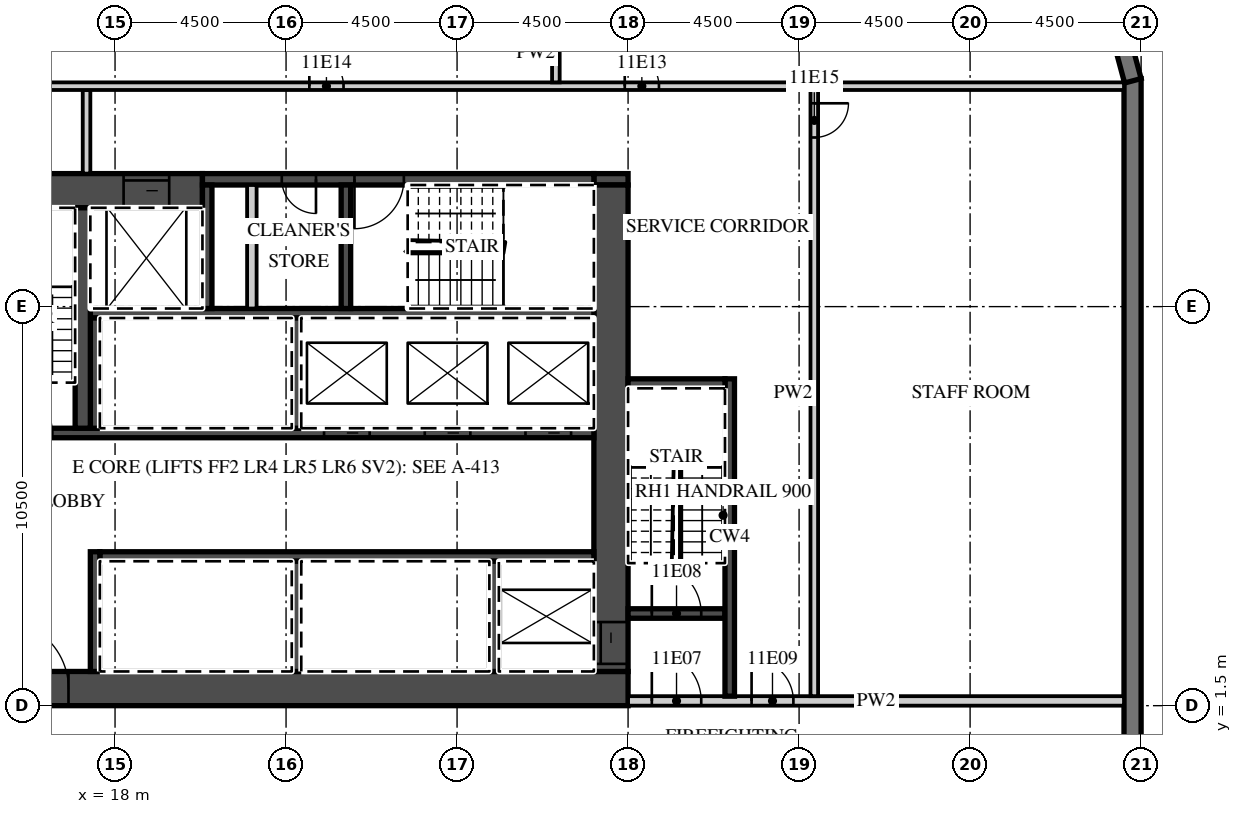
"""IFC4 building model, lengths in metres.
Left out: names, types, materials, properties, quantities, classifications, styles, units other than length and angle.
Written with IfcOpenShell. Run it as: python <this file> out.ifc"""

import sys

from ifc_helpers import new_model, si_unit, direction, frame, frame_2d, origin, place, context, subcontext, project, spatial, polyline, rectangle, outline, extrude, element, fill, save


model = new_model("IFC4")
c1 = context("Model", 3, precision=1e-05, world=origin(), true_north=direction((0.0, 1.0)))
c2 = subcontext(c1, "Body", "Model", "MODEL_VIEW")
j1 = project(units=[si_unit("LENGTHUNIT", "METRE"), si_unit("PLANEANGLEUNIT", "RADIAN")], contexts=[c1])
p1 = place(None, origin())
s1 = spatial("IfcSite", under=j1, at=p1, CompositionType="ELEMENT")
p2 = place(p1, origin())
s2 = spatial("IfcBuilding", under=s1, at=p2, CompositionType="ELEMENT")
p3 = place(p2, frame((0.0, 0.0, 66.6)))
s3 = spatial("IfcBuildingStorey", under=s2, at=p3, CompositionType="ELEMENT", Elevation=66.6)
p4 = place(p3, frame((44.775, -18.0, 0.0), z_axis=(0.0, 0.0, 1.0), x_axis=(0.0, 1.0, 0.0)))
e1 = element("IfcWall", 1, at=p4, inside=s3, PredefinedType="SOLIDWALL", context=c2, shape_type="SweptSolid", body=[
    extrude(rectangle(XDim=36.0, YDim=0.45, at=frame_2d((18.0, 0.0))), origin(), (0.0, 0.0, 1.0), 3.02),
])
p5 = place(p4, frame((3.9, 0.0, 0.45)))
e2 = element("IfcOpeningElement", 2, at=p5, cuts=e1, PredefinedType="OPENING", context=c2, shape_type="SweptSolid", body=[
    extrude(rectangle(XDim=3.3, YDim=2.25, at=frame_2d((1.65, 1.125))), frame((0.0, 0.235, 0.0), z_axis=(0.0, -1.0, 0.0), x_axis=(1.0, 0.0, 0.0)), (0.0, 0.0, 1.0), 0.47),
])
p6 = place(p4, frame((8.4, 0.0, 0.45)))
e3 = element("IfcOpeningElement", 3, at=p6, cuts=e1, PredefinedType="OPENING", context=c2, shape_type="SweptSolid", body=[
    extrude(rectangle(XDim=3.3, YDim=2.25, at=frame_2d((1.65, 1.125))), frame((0.0, 0.235, 0.0), z_axis=(0.0, -1.0, 0.0), x_axis=(1.0, 0.0, 0.0)), (0.0, 0.0, 1.0), 0.47),
])
p7 = place(p4, frame((12.9, 0.0, 0.45)))
e4 = element("IfcOpeningElement", 4, at=p7, cuts=e1, PredefinedType="OPENING", context=c2, shape_type="SweptSolid", body=[
    extrude(rectangle(XDim=3.3, YDim=2.25, at=frame_2d((1.65, 1.125))), frame((0.0, 0.235, 0.0), z_axis=(0.0, -1.0, 0.0), x_axis=(1.0, 0.0, 0.0)), (0.0, 0.0, 1.0), 0.47),
])
p8 = place(p3, frame((44.783, 17.942, 0.0), z_axis=(0.0, 0.0, 1.0), x_axis=(-0.25881466832, 0.965926999034, 0.0)))
e5 = element("IfcWall", 5, at=p8, inside=s3, PredefinedType="SOLIDWALL", context=c2, shape_type="SweptSolid", body=[
    extrude(outline(polyline([(0.0, -0.225), (2.071, -0.225), (1.95, 0.225), (0.121, 0.225), (0.0, -0.225)])), origin(), (0.0, 0.0, 1.0), 3.02),
])
p9 = place(p3, frame((13.5, 1.95, 0.0), z_axis=(0.0, 0.0, 1.0), x_axis=(1.0, 0.0, 0.0)))
e6 = element("IfcWall", 6, at=p9, inside=s3, PredefinedType="SHEAR", context=c2, shape_type="SweptSolid", body=[
    extrude(rectangle(XDim=18.0, YDim=0.9, at=frame_2d((9.0, 0.0))), origin(), (0.0, 0.0, 1.0), 3.02),
])
p10 = place(p9, frame((1.475, 0.0, 0.0)))
e7 = element("IfcOpeningElement", 7, at=p10, cuts=e6, PredefinedType="OPENING", context=c2, shape_type="SweptSolid", body=[
    extrude(rectangle(XDim=1.8, YDim=2.1, at=frame_2d((0.9, 1.05))), frame((0.0, 0.46, 0.0), z_axis=(0.0, -1.0, 0.0), x_axis=(1.0, 0.0, 0.0)), (0.0, 0.0, 1.0), 0.92),
])
p11 = place(p3, frame((13.5, 15.05, 0.0), z_axis=(0.0, 0.0, 1.0), x_axis=(1.0, 0.0, 0.0)))
e8 = element("IfcWall", 8, at=p11, inside=s3, PredefinedType="SHEAR", context=c2, shape_type="SweptSolid", body=[
    extrude(rectangle(XDim=6.8, YDim=0.9, at=frame_2d((3.4, 0.0))), origin(), (0.0, 0.0, 1.0), 3.02),
])
p12 = place(p11, frame((4.725, 0.0, 0.0)))
e9 = element("IfcOpeningElement", 9, at=p12, cuts=e8, PredefinedType="OPENING", context=c2, shape_type="SweptSolid", body=[
    extrude(rectangle(XDim=1.2, YDim=2.1, at=frame_2d((0.6, 1.05))), frame((0.0, 0.46, 0.0), z_axis=(0.0, -1.0, 0.0), x_axis=(1.0, 0.0, 0.0)), (0.0, 0.0, 1.0), 0.92),
])
p13 = place(p3, frame((30.6, 15.35, 0.0), z_axis=(0.0, 0.0, 1.0), x_axis=(1.0, 0.0, 0.0)))
e10 = element("IfcWall", 10, at=p13, inside=s3, PredefinedType="SHEAR", context=c2, shape_type="SweptSolid", body=[
    extrude(rectangle(XDim=0.9, YDim=0.3, at=frame_2d((0.45, 0.0))), origin(), (0.0, 0.0, 1.0), 3.02),
])
p14 = place(p3, frame((20.3, 15.35, 0.0), z_axis=(0.0, 0.0, 1.0), x_axis=(1.0, 0.0, 0.0)))
e11 = element("IfcWall", 11, at=p14, inside=s3, PredefinedType="SHEAR", context=c2, shape_type="SweptSolid", body=[
    extrude(rectangle(XDim=10.3, YDim=0.3, at=frame_2d((5.15, 0.0))), origin(), (0.0, 0.0, 1.0), 3.02),
])
p15 = place(p14, frame((4.0, 0.0, 0.0)))
e12 = element("IfcOpeningElement", 12, at=p15, cuts=e11, PredefinedType="OPENING", context=c2, shape_type="SweptSolid", body=[
    extrude(rectangle(XDim=1.3, YDim=2.1, at=frame_2d((0.65, 1.05))), frame((0.0, 0.16, 0.0), z_axis=(0.0, -1.0, 0.0), x_axis=(1.0, 0.0, 0.0)), (0.0, 0.0, 1.0), 0.32),
])
p16 = place(p14, frame((2.087, 0.0, 0.0)))
e13 = element("IfcOpeningElement", 13, at=p16, cuts=e11, PredefinedType="OPENING", context=c2, shape_type="SweptSolid", body=[
    extrude(rectangle(XDim=0.9, YDim=2.1, at=frame_2d((0.45, 1.05))), frame((0.0, 0.16, 0.0), z_axis=(0.0, -1.0, 0.0), x_axis=(1.0, 0.0, 0.0)), (0.0, 0.0, 1.0), 0.32),
])
p17 = place(p3, frame((31.05, 2.4, 0.0), z_axis=(0.0, 0.0, 1.0), x_axis=(0.0, 1.0, 0.0)))
e14 = element("IfcWall", 14, at=p17, inside=s3, PredefinedType="SHEAR", context=c2, shape_type="SweptSolid", body=[
    extrude(rectangle(XDim=12.8, YDim=0.9, at=frame_2d((6.4, 0.0))), origin(), (0.0, 0.0, 1.0), 3.02),
])
p18 = place(p17, frame((0.2, 0.0, 0.0)))
e15 = element("IfcOpeningElement", 15, at=p18, cuts=e14, PredefinedType="OPENING", context=c2, shape_type="SweptSolid", body=[
    extrude(rectangle(XDim=1.1, YDim=2.1, at=frame_2d((0.55, 1.05))), frame((0.0, 0.46, 0.0), z_axis=(0.0, -1.0, 0.0), x_axis=(1.0, 0.0, 0.0)), (0.0, 0.0, 1.0), 0.92),
])
p19 = place(p3, frame((17.6, 5.425, 0.0), z_axis=(0.0, 0.0, 1.0), x_axis=(1.0, 0.0, 0.0)))
e16 = element("IfcWall", 16, at=p19, inside=s3, PredefinedType="SHEAR", context=c2, shape_type="SweptSolid", body=[
    extrude(rectangle(XDim=13.0, YDim=0.25, at=frame_2d((6.5, 0.0))), origin(), (0.0, 0.0, 1.0), 3.02),
])
p20 = place(p3, frame((17.475, 2.4, 0.0), z_axis=(0.0, 0.0, 1.0), x_axis=(0.0, 1.0, 0.0)))
e17 = element("IfcWall", 17, at=p20, inside=s3, PredefinedType="SHEAR", context=c2, shape_type="SweptSolid", body=[
    extrude(rectangle(XDim=3.15, YDim=0.25, at=frame_2d((1.575, 0.0))), origin(), (0.0, 0.0, 1.0), 3.02),
])
for number, where, z_axis, x_axis in (
    (18, (27.975, 2.4, 0.0), (0.0, 0.0, 1.0), (0.0, 1.0, 0.0)),
    (19, (22.775, 2.4, 0.0), (0.0, 0.0, 1.0), (0.0, 1.0, 0.0)),
):
    element("IfcWall", number, at=place(p3, frame(where, z_axis=z_axis, x_axis=x_axis)), inside=s3, PredefinedType="SHEAR", context=c2, shape_type="SweptSolid", body=[
        extrude(rectangle(XDim=2.9, YDim=0.25, at=frame_2d((1.45, 0.0))), origin(), (0.0, 0.0, 1.0), 3.02),
    ])
p21 = place(p3, frame((14.4, 8.675, 0.0), z_axis=(0.0, 0.0, 1.0), x_axis=(1.0, 0.0, 0.0)))
e20 = element("IfcWall", 20, at=p21, inside=s3, PredefinedType="SHEAR", context=c2, shape_type="SweptSolid", body=[
    extrude(rectangle(XDim=16.2, YDim=0.25, at=frame_2d((8.1, 0.0))), origin(), (0.0, 0.0, 1.0), 3.02),
])
p22 = place(p21, frame((14.4, 0.0, 0.0)))
e21 = element("IfcOpeningElement", 21, at=p22, cuts=e20, PredefinedType="OPENING", context=c2, shape_type="SweptSolid", body=[
    extrude(rectangle(XDim=1.2, YDim=2.1, at=frame_2d((0.6, 1.05))), frame((0.0, 0.135, 0.0), z_axis=(0.0, -1.0, 0.0), x_axis=(1.0, 0.0, 0.0)), (0.0, 0.0, 1.0), 0.27),
])
p23 = place(p21, frame((11.75, 0.0, 0.0)))
e22 = element("IfcOpeningElement", 22, at=p23, cuts=e20, PredefinedType="OPENING", context=c2, shape_type="SweptSolid", body=[
    extrude(rectangle(XDim=1.2, YDim=2.1, at=frame_2d((0.6, 1.05))), frame((0.0, 0.135, 0.0), z_axis=(0.0, -1.0, 0.0), x_axis=(1.0, 0.0, 0.0)), (0.0, 0.0, 1.0), 0.27),
])
p24 = place(p21, frame((9.1, 0.0, 0.0)))
e23 = element("IfcOpeningElement", 23, at=p24, cuts=e20, PredefinedType="OPENING", context=c2, shape_type="SweptSolid", body=[
    extrude(rectangle(XDim=1.2, YDim=2.1, at=frame_2d((0.6, 1.05))), frame((0.0, 0.135, 0.0), z_axis=(0.0, -1.0, 0.0), x_axis=(1.0, 0.0, 0.0)), (0.0, 0.0, 1.0), 0.27),
])
p25 = place(p21, frame((0.65, 0.0, 0.0)))
e24 = element("IfcOpeningElement", 24, at=p25, cuts=e20, PredefinedType="OPENING", context=c2, shape_type="SweptSolid", body=[
    extrude(rectangle(XDim=1.3, YDim=2.1, at=frame_2d((0.65, 1.05))), frame((0.0, 0.135, 0.0), z_axis=(0.0, -1.0, 0.0), x_axis=(1.0, 0.0, 0.0)), (0.0, 0.0, 1.0), 0.27),
])
p26 = place(p3, frame((17.35, 11.825, 0.0), z_axis=(0.0, 0.0, 1.0), x_axis=(1.0, 0.0, 0.0)))
e25 = element("IfcWall", 25, at=p26, inside=s3, PredefinedType="SHEAR", context=c2, shape_type="SweptSolid", body=[
    extrude(rectangle(XDim=13.25, YDim=0.25, at=frame_2d((6.625, 0.0))), origin(), (0.0, 0.0, 1.0), 3.02),
])
for number, where, z_axis, x_axis in (
    (26, (17.475, 8.8, 0.0), (0.0, 0.0, 1.0), (0.0, 1.0, 0.0)),
    (27, (22.775, 8.8, 0.0), (0.0, 0.0, 1.0), (0.0, 1.0, 0.0)),
):
    element("IfcWall", number, at=place(p3, frame(where, z_axis=z_axis, x_axis=x_axis)), inside=s3, PredefinedType="SHEAR", context=c2, shape_type="SweptSolid", body=[
        extrude(rectangle(XDim=2.9, YDim=0.25, at=frame_2d((1.45, 0.0))), origin(), (0.0, 0.0, 1.0), 3.02),
    ])
p27 = place(p3, frame((17.15, 8.8, 0.0), z_axis=(0.0, 0.0, 1.0), x_axis=(0.0, 1.0, 0.0)))
e28 = element("IfcWall", 28, at=p27, inside=s3, PredefinedType="SHEAR", context=c2, shape_type="SweptSolid", body=[
    extrude(rectangle(XDim=5.8, YDim=0.4, at=frame_2d((2.9, 0.0))), origin(), (0.0, 0.0, 1.0), 3.02),
])
for number, where, z_axis, x_axis in (
    (29, (20.425, 11.95, 0.0), (0.0, 0.0, 1.0), (0.0, 1.0, 0.0)),
    (30, (24.075, 11.95, 0.0), (0.0, 0.0, 1.0), (0.0, 1.0, 0.0)),
):
    element("IfcWall", number, at=place(p3, frame(where, z_axis=z_axis, x_axis=x_axis)), inside=s3, PredefinedType="SHEAR", context=c2, shape_type="SweptSolid", body=[
        extrude(rectangle(XDim=3.25, YDim=0.25, at=frame_2d((1.625, 0.0))), origin(), (0.0, 0.0, 1.0), 3.02),
    ])
p28 = place(p3, frame((21.6, 11.95, 0.0), z_axis=(0.0, 0.0, 1.0), x_axis=(0.0, 1.0, 0.0)))
e31 = element("IfcWall", 31, at=p28, inside=s3, PredefinedType="PARTITIONING", context=c2, shape_type="SweptSolid", body=[
    extrude(rectangle(XDim=3.25, YDim=0.25, at=frame_2d((1.625, 0.0))), origin(), (0.0, 0.0, 1.0), 3.02),
])
p29 = place(p3, frame((31.5, 1.625, 0.0), z_axis=(0.0, 0.0, 1.0), x_axis=(1.0, 0.0, 0.0)))
e32 = element("IfcWall", 32, at=p29, inside=s3, PredefinedType="PARTITIONING", context=c2, shape_type="SweptSolid", body=[
    extrude(rectangle(XDim=13.05, YDim=0.25, at=frame_2d((6.525, 0.0))), origin(), (0.0, 0.0, 1.0), 3.02),
])
p30 = place(p29, frame((0.625, 0.0, 0.0)))
e33 = element("IfcOpeningElement", 33, at=p30, cuts=e32, PredefinedType="OPENING", context=c2, shape_type="SweptSolid", body=[
    extrude(rectangle(XDim=1.3, YDim=2.1, at=frame_2d((0.65, 1.05))), frame((0.0, 0.135, 0.0), z_axis=(0.0, -1.0, 0.0), x_axis=(1.0, 0.0, 0.0)), (0.0, 0.0, 1.0), 0.27),
])
p31 = place(p29, frame((3.25, 0.0, 0.0)))
e34 = element("IfcOpeningElement", 34, at=p31, cuts=e32, PredefinedType="OPENING", context=c2, shape_type="SweptSolid", body=[
    extrude(rectangle(XDim=1.1, YDim=2.1, at=frame_2d((0.55, 1.05))), frame((0.0, 0.135, 0.0), z_axis=(0.0, -1.0, 0.0), x_axis=(1.0, 0.0, 0.0)), (0.0, 0.0, 1.0), 0.27),
])
p32 = place(p3, frame((31.5, 3.925, 0.0), z_axis=(0.0, 0.0, 1.0), x_axis=(1.0, 0.0, 0.0)))
e35 = element("IfcWall", 35, at=p32, inside=s3, PredefinedType="SHEAR", context=c2, shape_type="SweptSolid", body=[
    extrude(rectangle(XDim=2.55, YDim=0.25, at=frame_2d((1.275, 0.0))), origin(), (0.0, 0.0, 1.0), 3.02),
])
p33 = place(p32, frame((0.625, 0.0, 0.0)))
e36 = element("IfcOpeningElement", 36, at=p33, cuts=e35, PredefinedType="OPENING", context=c2, shape_type="SweptSolid", body=[
    extrude(rectangle(XDim=1.3, YDim=2.1, at=frame_2d((0.65, 1.05))), frame((0.0, 0.135, 0.0), z_axis=(0.0, -1.0, 0.0), x_axis=(1.0, 0.0, 0.0)), (0.0, 0.0, 1.0), 0.27),
])
p34 = place(p3, frame((34.175, 1.75, 0.0), z_axis=(0.0, 0.0, 1.0), x_axis=(0.0, 1.0, 0.0)))
e37 = element("IfcWall", 37, at=p34, inside=s3, PredefinedType="SHEAR", context=c2, shape_type="SweptSolid", body=[
    extrude(rectangle(XDim=8.35, YDim=0.25, at=frame_2d((4.175, 0.0))), origin(), (0.0, 0.0, 1.0), 3.02),
])
p35 = place(p3, frame((31.5, 9.975, 0.0), z_axis=(0.0, 0.0, 1.0), x_axis=(1.0, 0.0, 0.0)))
e38 = element("IfcWall", 38, at=p35, inside=s3, PredefinedType="SHEAR", context=c2, shape_type="SweptSolid", body=[
    extrude(rectangle(XDim=2.55, YDim=0.25, at=frame_2d((1.275, 0.0))), origin(), (0.0, 0.0, 1.0), 3.02),
])
p36 = place(p3, frame((17.25, 15.5, 0.0), z_axis=(0.0, 0.0, 1.0), x_axis=(0.0, 1.0, 0.0)))
e39 = element("IfcWall", 39, at=p36, inside=s3, PredefinedType="PARTITIONING", context=c2, shape_type="SweptSolid", body=[
    extrude(rectangle(XDim=2.2, YDim=0.2, at=frame_2d((1.1, 0.0))), origin(), (0.0, 0.0, 1.0), 3.02),
])
p37 = place(p3, frame((36.4, 1.75, 0.0), z_axis=(0.0, 0.0, 1.0), x_axis=(0.0, 1.0, 0.0)))
e40 = element("IfcWall", 40, at=p37, inside=s3, PredefinedType="PARTITIONING", context=c2, shape_type="SweptSolid", body=[
    extrude(rectangle(XDim=15.95, YDim=0.2, at=frame_2d((7.975, 0.0))), origin(), (0.0, 0.0, 1.0), 3.02),
])
p38 = place(p37, frame((14.7, 0.0, 0.0)))
e41 = element("IfcOpeningElement", 41, at=p38, cuts=e40, PredefinedType="OPENING", context=c2, shape_type="SweptSolid", body=[
    extrude(rectangle(XDim=0.9, YDim=2.1, at=frame_2d((0.45, 1.05))), frame((0.0, 0.11, 0.0), z_axis=(0.0, -1.0, 0.0), x_axis=(1.0, 0.0, 0.0)), (0.0, 0.0, 1.0), 0.22),
])
p39 = place(p3, frame((13.6, 17.8, 0.0), z_axis=(0.0, 0.0, 1.0), x_axis=(1.0, 0.0, 0.0)))
e42 = element("IfcWall", 42, at=p39, inside=s3, PredefinedType="PARTITIONING", context=c2, shape_type="SweptSolid", body=[
    extrude(rectangle(XDim=30.95, YDim=0.2, at=frame_2d((15.475, 0.0))), origin(), (0.0, 0.0, 1.0), 3.02),
])
p40 = place(p39, frame((17.812, 0.0, 0.0)))
e43 = element("IfcOpeningElement", 43, at=p40, cuts=e42, PredefinedType="OPENING", context=c2, shape_type="SweptSolid", body=[
    extrude(rectangle(XDim=0.9, YDim=2.1, at=frame_2d((0.45, 1.05))), frame((0.0, 0.11, 0.0), z_axis=(0.0, -1.0, 0.0), x_axis=(1.0, 0.0, 0.0)), (0.0, 0.0, 1.0), 0.22),
])
p41 = place(p39, frame((9.512, 0.0, 0.0)))
e44 = element("IfcOpeningElement", 44, at=p41, cuts=e42, PredefinedType="OPENING", context=c2, shape_type="SweptSolid", body=[
    extrude(rectangle(XDim=0.9, YDim=2.1, at=frame_2d((0.45, 1.05))), frame((0.0, 0.11, 0.0), z_axis=(0.0, -1.0, 0.0), x_axis=(1.0, 0.0, 0.0)), (0.0, 0.0, 1.0), 0.22),
])
p42 = place(p3, frame((29.6, 17.9, 0.0), z_axis=(0.0, 0.0, 1.0), x_axis=(0.0, 1.0, 0.0)))
e45 = element("IfcWall", 45, at=p42, inside=s3, PredefinedType="PARTITIONING", context=c2, shape_type="SweptSolid", body=[
    extrude(rectangle(XDim=3.65, YDim=0.2, at=frame_2d((1.825, 0.0))), origin(), (0.0, 0.0, 1.0), 3.02),
])
p43 = place(p22, origin())
e46 = element("IfcDoor", 46, at=p43, inside=s3, OperationType="SLIDING_TO_LEFT", PredefinedType="DOOR", context=c2, shape_type="SweptSolid", body=[
    extrude(rectangle(XDim=1.2, YDim=2.1, at=frame_2d((0.6, 1.05))), frame((0.0, 0.025, 0.0), z_axis=(0.0, -1.0, 0.0), x_axis=(1.0, 0.0, 0.0)), (0.0, 0.0, 1.0), 0.05),
])
fill(e21, e46)
p44 = place(p23, origin())
e47 = element("IfcDoor", 47, at=p44, inside=s3, OperationType="SLIDING_TO_RIGHT", PredefinedType="DOOR", context=c2, shape_type="SweptSolid", body=[
    extrude(rectangle(XDim=1.2, YDim=2.1, at=frame_2d((0.6, 1.05))), frame((0.0, 0.025, 0.0), z_axis=(0.0, -1.0, 0.0), x_axis=(1.0, 0.0, 0.0)), (0.0, 0.0, 1.0), 0.05),
])
fill(e22, e47)
p45 = place(p24, origin())
e48 = element("IfcDoor", 48, at=p45, inside=s3, OperationType="SLIDING_TO_RIGHT", PredefinedType="DOOR", context=c2, shape_type="SweptSolid", body=[
    extrude(rectangle(XDim=1.2, YDim=2.1, at=frame_2d((0.6, 1.05))), frame((0.0, 0.025, 0.0), z_axis=(0.0, -1.0, 0.0), x_axis=(1.0, 0.0, 0.0)), (0.0, 0.0, 1.0), 0.05),
])
fill(e23, e48)
p46 = place(p12, origin())
e49 = element("IfcDoor", 49, at=p46, inside=s3, OperationType="SLIDING_TO_LEFT", PredefinedType="DOOR", context=c2, shape_type="SweptSolid", body=[
    extrude(rectangle(XDim=1.2, YDim=2.1, at=frame_2d((0.6, 1.05))), frame((0.0, 0.025, 0.0), z_axis=(0.0, -1.0, 0.0), x_axis=(1.0, 0.0, 0.0)), (0.0, 0.0, 1.0), 0.05),
])
fill(e9, e49)
p47 = place(p18, origin())
e50 = element("IfcDoor", 50, at=p47, inside=s3, OperationType="SLIDING_TO_LEFT", PredefinedType="DOOR", context=c2, shape_type="SweptSolid", body=[
    extrude(rectangle(XDim=1.1, YDim=2.1, at=frame_2d((0.55, 1.05))), frame((0.0, 0.025, 0.0), z_axis=(0.0, -1.0, 0.0), x_axis=(1.0, 0.0, 0.0)), (0.0, 0.0, 1.0), 0.05),
])
fill(e15, e50)
p48 = place(p10, origin())
e51 = element("IfcDoor", 51, at=p48, inside=s3, OperationType="DOUBLE_DOOR_DOUBLE_SWING", PredefinedType="DOOR", context=c2, shape_type="SweptSolid", body=[
    extrude(rectangle(XDim=1.8, YDim=2.1, at=frame_2d((0.9, 1.05))), frame((0.0, 0.025, 0.0), z_axis=(0.0, -1.0, 0.0), x_axis=(1.0, 0.0, 0.0)), (0.0, 0.0, 1.0), 0.05),
])
fill(e7, e51)
p49 = place(p30, origin())
e52 = element("IfcDoor", 52, at=p49, inside=s3, OperationType="SINGLE_SWING_LEFT", PredefinedType="DOOR", context=c2, shape_type="SweptSolid", body=[
    extrude(rectangle(XDim=1.3, YDim=2.1, at=frame_2d((0.65, 1.05))), frame((0.0, 0.025, 0.0), z_axis=(0.0, -1.0, 0.0), x_axis=(1.0, 0.0, 0.0)), (0.0, 0.0, 1.0), 0.05),
])
fill(e33, e52)
p50 = place(p33, origin())
e53 = element("IfcDoor", 53, at=p50, inside=s3, OperationType="SINGLE_SWING_LEFT", PredefinedType="DOOR", context=c2, shape_type="SweptSolid", body=[
    extrude(rectangle(XDim=1.3, YDim=2.1, at=frame_2d((0.65, 1.05))), frame((0.0, 0.025, 0.0), z_axis=(0.0, -1.0, 0.0), x_axis=(1.0, 0.0, 0.0)), (0.0, 0.0, 1.0), 0.05),
])
fill(e36, e53)
p51 = place(p31, origin())
e54 = element("IfcDoor", 54, at=p51, inside=s3, OperationType="SINGLE_SWING_LEFT", PredefinedType="DOOR", context=c2, shape_type="SweptSolid", body=[
    extrude(rectangle(XDim=1.1, YDim=2.1, at=frame_2d((0.55, 1.05))), frame((0.0, 0.025, 0.0), z_axis=(0.0, -1.0, 0.0), x_axis=(1.0, 0.0, 0.0)), (0.0, 0.0, 1.0), 0.05),
])
fill(e34, e54)
p52 = place(p15, origin())
e55 = element("IfcDoor", 55, at=p52, inside=s3, OperationType="SINGLE_SWING_LEFT", PredefinedType="DOOR", context=c2, shape_type="SweptSolid", body=[
    extrude(rectangle(XDim=1.3, YDim=2.1, at=frame_2d((0.65, 1.05))), frame((0.0, 0.025, 0.0), z_axis=(0.0, -1.0, 0.0), x_axis=(1.0, 0.0, 0.0)), (0.0, 0.0, 1.0), 0.05),
])
fill(e12, e55)
p53 = place(p16, origin())
e56 = element("IfcDoor", 56, at=p53, inside=s3, OperationType="SINGLE_SWING_RIGHT", PredefinedType="DOOR", context=c2, shape_type="SweptSolid", body=[
    extrude(rectangle(XDim=0.9, YDim=2.1, at=frame_2d((0.45, 1.05))), frame((0.0, 0.025, 0.0), z_axis=(0.0, -1.0, 0.0), x_axis=(1.0, 0.0, 0.0)), (0.0, 0.0, 1.0), 0.05),
])
fill(e13, e56)
p54 = place(p40, origin())
e57 = element("IfcDoor", 57, at=p54, inside=s3, OperationType="SINGLE_SWING_LEFT", PredefinedType="DOOR", context=c2, shape_type="SweptSolid", body=[
    extrude(rectangle(XDim=0.9, YDim=2.1, at=frame_2d((0.45, 1.05))), frame((0.0, 0.025, 0.0), z_axis=(0.0, -1.0, 0.0), x_axis=(1.0, 0.0, 0.0)), (0.0, 0.0, 1.0), 0.05),
])
fill(e43, e57)
p55 = place(p41, origin())
e58 = element("IfcDoor", 58, at=p55, inside=s3, OperationType="SINGLE_SWING_LEFT", PredefinedType="DOOR", context=c2, shape_type="SweptSolid", body=[
    extrude(rectangle(XDim=0.9, YDim=2.1, at=frame_2d((0.45, 1.05))), frame((0.0, 0.025, 0.0), z_axis=(0.0, -1.0, 0.0), x_axis=(1.0, 0.0, 0.0)), (0.0, 0.0, 1.0), 0.05),
])
fill(e44, e58)
p56 = place(p38, origin())
e59 = element("IfcDoor", 59, at=p56, inside=s3, OperationType="SINGLE_SWING_RIGHT", PredefinedType="DOOR", context=c2, shape_type="SweptSolid", body=[
    extrude(rectangle(XDim=0.9, YDim=2.1, at=frame_2d((0.45, 1.05))), frame((0.0, 0.025, 0.0), z_axis=(0.0, -1.0, 0.0), x_axis=(1.0, 0.0, 0.0)), (0.0, 0.0, 1.0), 0.05),
])
fill(e41, e59)
save(model, sys.argv[1])
